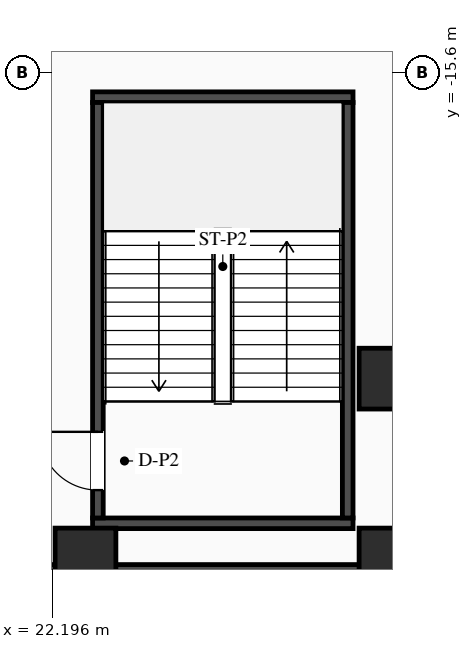
"""IFC4 building model, lengths in metres.
Left out: names, types, materials, properties, quantities, classifications, styles, units other than length and angle.
Written with IfcOpenShell. Run it as: python <this file> out.ifc"""

import sys

from ifc_helpers import new_model, si_unit, direction, frame, frame_2d, origin, origin_2d, place, context, subcontext, project, spatial, rectangle, extrude, element, fill, save


model = new_model("IFC4")
c1 = context("Model", 3, precision=1e-05, world=origin(), true_north=direction((0.0, 1.0)))
c2 = subcontext(c1, "Body", "Model", "MODEL_VIEW")
j1 = project(units=[si_unit("LENGTHUNIT", "METRE"), si_unit("PLANEANGLEUNIT", "RADIAN")], contexts=[c1])
p1 = place(None, origin())
s1 = spatial("IfcSite", under=j1, at=p1, CompositionType="ELEMENT")
p2 = place(p1, origin())
s2 = spatial("IfcBuilding", under=s1, at=p2, CompositionType="ELEMENT")
p3 = place(p2, frame((0.0, 0.0, -4.8)))
s3 = spatial("IfcBuildingStorey", under=s2, at=p3, CompositionType="ELEMENT", Elevation=-4.8)
p4 = place(p3, frame((-39.0, -25.66, 0.0), z_axis=(0.0, 0.0, 1.0), x_axis=(1.0, 0.0, 0.0)))
e1 = element("IfcWall", 1, at=p4, inside=s3, PredefinedType="SOLIDWALL", context=c2, shape_type="SweptSolid", body=[
    extrude(rectangle(XDim=78.0, YDim=0.68, at=frame_2d((39.0, 0.0))), origin(), (0.0, 0.0, 1.0), 4.45),
])
for number, where, z_axis, x_axis in (
    (2, (22.99, -24.505, 0.0), (0.0, 0.0, 1.0), (1.0, 0.0, 0.0)),
    (3, (22.99, -16.095, 0.0), (0.0, 0.0, 1.0), (1.0, 0.0, 0.0)),
):
    element("IfcWall", number, at=place(p3, frame(where, z_axis=z_axis, x_axis=x_axis)), inside=s3, PredefinedType="SHEAR", context=c2, shape_type="SweptSolid", body=[
        extrude(rectangle(XDim=5.14, YDim=0.21, at=frame_2d((2.57, 0.0))), origin(), (0.0, 0.0, 1.0), 4.45),
    ])
p5 = place(p3, frame((23.095, -24.4, 0.0), z_axis=(0.0, 0.0, 1.0), x_axis=(0.0, 1.0, 0.0)))
e4 = element("IfcWall", 4, at=p5, inside=s3, PredefinedType="SHEAR", context=c2, shape_type="SweptSolid", body=[
    extrude(rectangle(XDim=8.2, YDim=0.21, at=frame_2d((4.1, 0.0))), origin(), (0.0, 0.0, 1.0), 4.45),
])
p6 = place(p5, frame((0.55, 0.0, 0.0)))
e5 = element("IfcOpeningElement", 5, at=p6, cuts=e4, PredefinedType="OPENING", context=c2, shape_type="SweptSolid", body=[
    extrude(rectangle(XDim=1.15, YDim=2.1, at=frame_2d((0.575, 1.05))), frame((0.0, 0.115, 0.0), z_axis=(0.0, -1.0, 0.0), x_axis=(1.0, 0.0, 0.0)), (0.0, 0.0, 1.0), 0.23),
])
p7 = place(p3, frame((28.025, -24.4, 0.0), z_axis=(0.0, 0.0, 1.0), x_axis=(0.0, 1.0, 0.0)))
e6 = element("IfcWall", 6, at=p7, inside=s3, PredefinedType="SHEAR", context=c2, shape_type="SweptSolid", body=[
    extrude(rectangle(XDim=8.2, YDim=0.21, at=frame_2d((4.1, 0.0))), origin(), (0.0, 0.0, 1.0), 4.45),
])
for number, where, z_axis, x_axis in (
    (7, (28.85, -21.65, 0.0), (0.0, 0.0, 1.0), (1.0, 0.0, 0.0)),
    (8, (22.85, -25.2, 0.0), (0.0, 0.0, 1.0), (1.0, 0.0, 0.0)),
    (9, (28.85, -25.2, 0.0), (0.0, 0.0, 1.0), (1.0, 0.0, 0.0)),
):
    element("IfcColumn", number, at=place(p3, frame(where, z_axis=z_axis, x_axis=x_axis)), inside=s3, PredefinedType="COLUMN", context=c2, shape_type="SweptSolid", body=[
        extrude(rectangle(XDim=1.2, YDim=1.2, at=origin_2d()), origin(), (0.0, 0.0, 1.0), 4.8),
    ])
p8 = place(p6, origin())
e10 = element("IfcDoor", 10, at=p8, inside=s3, OperationType="SINGLE_SWING_RIGHT", PredefinedType="DOOR", context=c2, shape_type="SweptSolid", body=[
    extrude(rectangle(XDim=1.15, YDim=2.1, at=frame_2d((0.575, 1.05))), frame((0.0, 0.025, 0.0), z_axis=(0.0, -1.0, 0.0), x_axis=(1.0, 0.0, 0.0)), (0.0, 0.0, 1.0), 0.05),
])
fill(e5, e10)
save(model, sys.argv[1])
